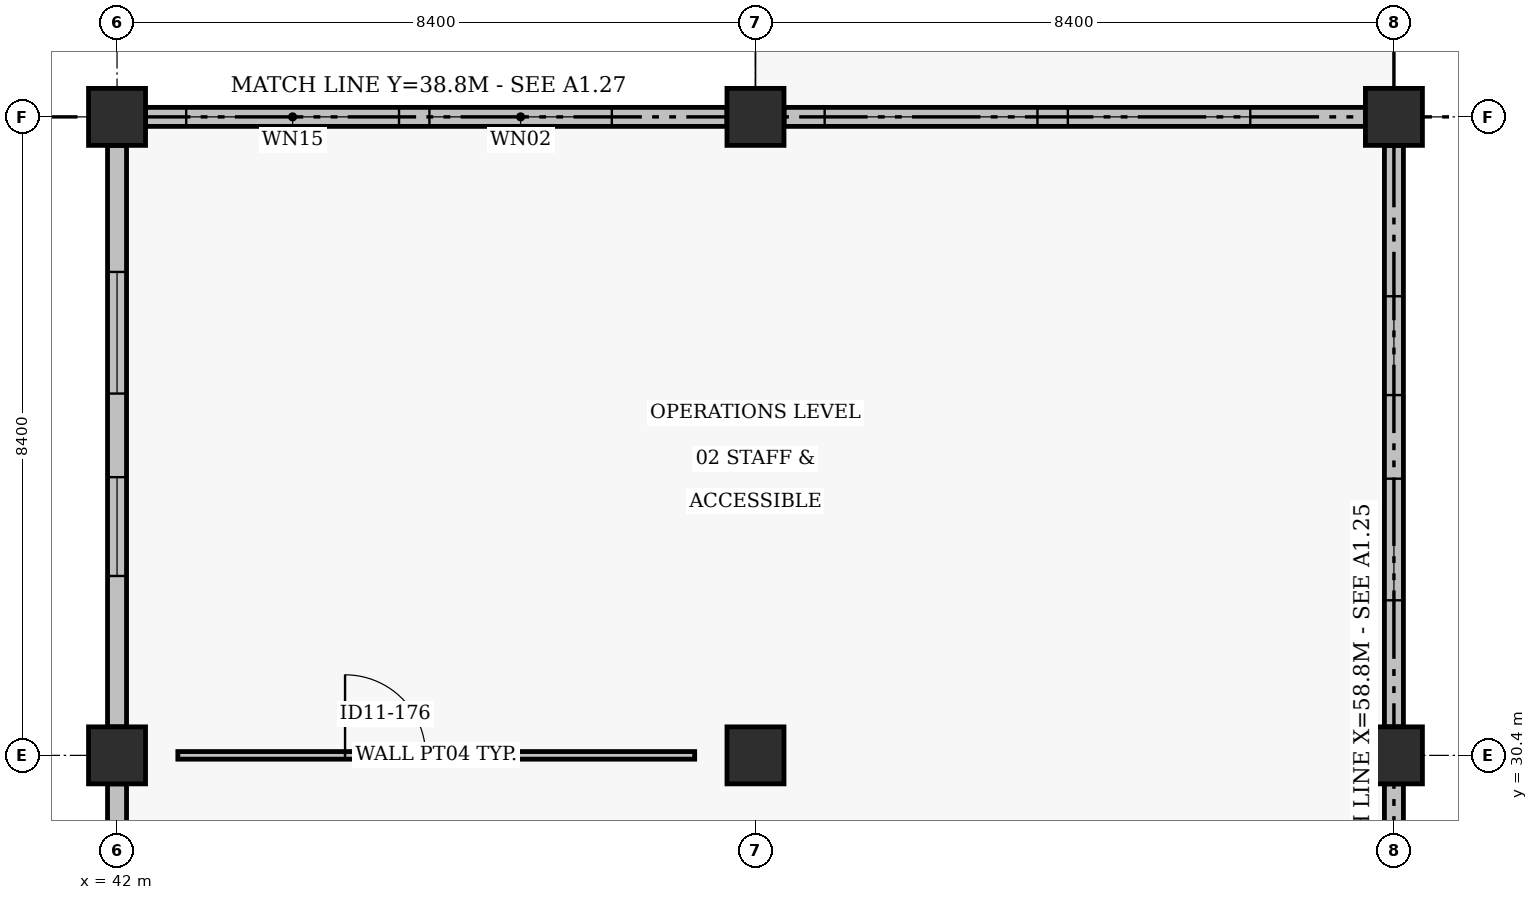
"""IFC4 building model, lengths in metres.
Left out: names, types, materials, properties, quantities, classifications, styles, units other than length and angle.
Written with IfcOpenShell. Run it as: python <this file> out.ifc"""

import sys

from ifc_helpers import new_model, si_unit, direction, frame, frame_2d, origin, origin_2d, place, context, subcontext, project, spatial, rectangle, extrude, element, fill, save


model = new_model("IFC4")
c1 = context("Model", 3, precision=1e-05, world=origin(), true_north=direction((0.0, 1.0)))
c2 = subcontext(c1, "Body", "Model", "MODEL_VIEW")
j1 = project(units=[si_unit("LENGTHUNIT", "METRE"), si_unit("PLANEANGLEUNIT", "RADIAN")], contexts=[c1])
p1 = place(None, origin())
s1 = spatial("IfcSite", under=j1, at=p1, CompositionType="ELEMENT")
p2 = place(p1, origin())
s2 = spatial("IfcBuilding", under=s1, at=p2, CompositionType="ELEMENT")
p3 = place(p2, frame((0.0, 0.0, 9.6)))
s3 = spatial("IfcBuildingStorey", under=s2, at=p3, CompositionType="ELEMENT", Elevation=9.6)
for number, where, z_axis, x_axis in (
    (1, (42.0, 30.4, 0.0), (0.0, 0.0, 1.0), (1.0, 0.0, 0.0)),
    (2, (42.0, 38.8, 0.0), (0.0, 0.0, 1.0), (1.0, 0.0, 0.0)),
    (3, (50.4, 30.4, 0.0), (0.0, 0.0, 1.0), (1.0, 0.0, 0.0)),
    (4, (50.4, 38.8, 0.0), (0.0, 0.0, 1.0), (1.0, 0.0, 0.0)),
    (5, (58.8, 30.4, 0.0), (0.0, 0.0, 1.0), (1.0, 0.0, 0.0)),
    (6, (58.8, 38.8, 0.0), (0.0, 0.0, 1.0), (1.0, 0.0, 0.0)),
):
    element("IfcColumn", number, at=place(p3, frame(where, z_axis=z_axis, x_axis=x_axis)), inside=s3, PredefinedType="COLUMN", context=c2, shape_type="SweptSolid", body=[
        extrude(rectangle(XDim=0.75, YDim=0.75, at=origin_2d()), origin(), (0.0, 0.0, 1.0), 3.52),
    ])
p4 = place(p3, frame((42.0, 30.025, 0.0), z_axis=(0.0, 0.0, 1.0), x_axis=(0.0, -1.0, 0.0)))
e7 = element("IfcWall", 7, at=p4, inside=s3, PredefinedType="SOLIDWALL", context=c2, shape_type="SweptSolid", body=[
    extrude(rectangle(XDim=7.65, YDim=0.25, at=frame_2d((3.825, 0.0))), origin(), (0.0, 0.0, 1.0), 2.805),
])
p5 = place(p4, frame((1.665, 0.0, 0.95)))
e8 = element("IfcOpeningElement", 8, at=p5, cuts=e7, PredefinedType="OPENING", context=c2, shape_type="SweptSolid", body=[
    extrude(rectangle(XDim=1.6, YDim=1.35, at=frame_2d((0.8, 0.675))), frame((0.0, 0.135, 0.0), z_axis=(0.0, -1.0, 0.0), x_axis=(1.0, 0.0, 0.0)), (0.0, 0.0, 1.0), 0.27),
])
p6 = place(p4, frame((4.365, 0.0, 0.95)))
e9 = element("IfcOpeningElement", 9, at=p6, cuts=e7, PredefinedType="OPENING", context=c2, shape_type="SweptSolid", body=[
    extrude(rectangle(XDim=1.3, YDim=1.35, at=frame_2d((0.65, 0.675))), frame((0.0, 0.135, 0.0), z_axis=(0.0, -1.0, 0.0), x_axis=(1.0, 0.0, 0.0)), (0.0, 0.0, 1.0), 0.27),
])
p7 = place(p3, frame((58.8, 22.375, 0.0), z_axis=(0.0, 0.0, 1.0), x_axis=(0.0, 1.0, 0.0)))
e10 = element("IfcWall", 10, at=p7, inside=s3, PredefinedType="SOLIDWALL", context=c2, shape_type="SweptSolid", body=[
    extrude(rectangle(XDim=7.65, YDim=0.25, at=frame_2d((3.825, 0.0))), origin(), (0.0, 0.0, 1.0), 2.805),
])
p8 = place(p7, frame((1.665, 0.0, 0.95)))
e11 = element("IfcOpeningElement", 11, at=p8, cuts=e10, PredefinedType="OPENING", context=c2, shape_type="SweptSolid", body=[
    extrude(rectangle(XDim=1.6, YDim=1.35, at=frame_2d((0.8, 0.675))), frame((0.0, 0.135, 0.0), z_axis=(0.0, -1.0, 0.0), x_axis=(1.0, 0.0, 0.0)), (0.0, 0.0, 1.0), 0.27),
])
p9 = place(p7, frame((4.365, 0.0, 0.95)))
e12 = element("IfcOpeningElement", 12, at=p9, cuts=e10, PredefinedType="OPENING", context=c2, shape_type="SweptSolid", body=[
    extrude(rectangle(XDim=1.3, YDim=1.35, at=frame_2d((0.65, 0.675))), frame((0.0, 0.135, 0.0), z_axis=(0.0, -1.0, 0.0), x_axis=(1.0, 0.0, 0.0)), (0.0, 0.0, 1.0), 0.27),
])
p10 = place(p3, frame((42.0, 38.425, 0.0), z_axis=(0.0, 0.0, 1.0), x_axis=(0.0, -1.0, 0.0)))
e13 = element("IfcWall", 13, at=p10, inside=s3, PredefinedType="SOLIDWALL", context=c2, shape_type="SweptSolid", body=[
    extrude(rectangle(XDim=7.65, YDim=0.25, at=frame_2d((3.825, 0.0))), origin(), (0.0, 0.0, 1.0), 2.805),
])
p11 = place(p10, frame((1.665, 0.0, 0.95)))
e14 = element("IfcOpeningElement", 14, at=p11, cuts=e13, PredefinedType="OPENING", context=c2, shape_type="SweptSolid", body=[
    extrude(rectangle(XDim=1.6, YDim=1.35, at=frame_2d((0.8, 0.675))), frame((0.0, 0.135, 0.0), z_axis=(0.0, -1.0, 0.0), x_axis=(1.0, 0.0, 0.0)), (0.0, 0.0, 1.0), 0.27),
])
p12 = place(p10, frame((4.365, 0.0, 0.95)))
e15 = element("IfcOpeningElement", 15, at=p12, cuts=e13, PredefinedType="OPENING", context=c2, shape_type="SweptSolid", body=[
    extrude(rectangle(XDim=1.3, YDim=1.35, at=frame_2d((0.65, 0.675))), frame((0.0, 0.135, 0.0), z_axis=(0.0, -1.0, 0.0), x_axis=(1.0, 0.0, 0.0)), (0.0, 0.0, 1.0), 0.27),
])
p13 = place(p3, frame((58.8, 30.775, 0.0), z_axis=(0.0, 0.0, 1.0), x_axis=(0.0, 1.0, 0.0)))
e16 = element("IfcWall", 16, at=p13, inside=s3, PredefinedType="SOLIDWALL", context=c2, shape_type="SweptSolid", body=[
    extrude(rectangle(XDim=7.65, YDim=0.25, at=frame_2d((3.825, 0.0))), origin(), (0.0, 0.0, 1.0), 2.805),
])
p14 = place(p13, frame((1.665, 0.0, 0.95)))
e17 = element("IfcOpeningElement", 17, at=p14, cuts=e16, PredefinedType="OPENING", context=c2, shape_type="SweptSolid", body=[
    extrude(rectangle(XDim=1.6, YDim=1.35, at=frame_2d((0.8, 0.675))), frame((0.0, 0.135, 0.0), z_axis=(0.0, -1.0, 0.0), x_axis=(1.0, 0.0, 0.0)), (0.0, 0.0, 1.0), 0.27),
])
p15 = place(p13, frame((4.365, 0.0, 0.95)))
e18 = element("IfcOpeningElement", 18, at=p15, cuts=e16, PredefinedType="OPENING", context=c2, shape_type="SweptSolid", body=[
    extrude(rectangle(XDim=1.3, YDim=1.35, at=frame_2d((0.65, 0.675))), frame((0.0, 0.135, 0.0), z_axis=(0.0, -1.0, 0.0), x_axis=(1.0, 0.0, 0.0)), (0.0, 0.0, 1.0), 0.27),
])
p16 = place(p3, frame((50.025, 38.8, 0.0), z_axis=(0.0, 0.0, 1.0), x_axis=(-1.0, 0.0, 0.0)))
e19 = element("IfcWall", 19, at=p16, inside=s3, PredefinedType="SOLIDWALL", context=c2, shape_type="SweptSolid", body=[
    extrude(rectangle(XDim=7.65, YDim=0.25, at=frame_2d((3.825, 0.0))), origin(), (0.0, 0.0, 1.0), 2.805),
])
p17 = place(p16, frame((1.515, 0.0, 0.95)))
e20 = element("IfcOpeningElement", 20, at=p17, cuts=e19, PredefinedType="OPENING", context=c2, shape_type="SweptSolid", body=[
    extrude(rectangle(XDim=2.4, YDim=1.5, at=frame_2d((1.2, 0.75))), frame((0.0, 0.135, 0.0), z_axis=(0.0, -1.0, 0.0), x_axis=(1.0, 0.0, 0.0)), (0.0, 0.0, 1.0), 0.27),
])
p18 = place(p16, frame((4.315, 0.0, 1.35)))
e21 = element("IfcOpeningElement", 21, at=p18, cuts=e19, PredefinedType="OPENING", context=c2, shape_type="SweptSolid", body=[
    extrude(rectangle(XDim=2.8, YDim=1.05, at=frame_2d((1.4, 0.525))), frame((0.0, 0.135, 0.0), z_axis=(0.0, -1.0, 0.0), x_axis=(1.0, 0.0, 0.0)), (0.0, 0.0, 1.0), 0.27),
])
p19 = place(p3, frame((58.425, 38.8, 0.0), z_axis=(0.0, 0.0, 1.0), x_axis=(-1.0, 0.0, 0.0)))
e22 = element("IfcWall", 22, at=p19, inside=s3, PredefinedType="SOLIDWALL", context=c2, shape_type="SweptSolid", body=[
    extrude(rectangle(XDim=7.65, YDim=0.25, at=frame_2d((3.825, 0.0))), origin(), (0.0, 0.0, 1.0), 2.805),
])
p20 = place(p19, frame((1.515, 0.0, 0.95)))
e23 = element("IfcOpeningElement", 23, at=p20, cuts=e22, PredefinedType="OPENING", context=c2, shape_type="SweptSolid", body=[
    extrude(rectangle(XDim=2.4, YDim=1.5, at=frame_2d((1.2, 0.75))), frame((0.0, 0.135, 0.0), z_axis=(0.0, -1.0, 0.0), x_axis=(1.0, 0.0, 0.0)), (0.0, 0.0, 1.0), 0.27),
])
p21 = place(p19, frame((4.315, 0.0, 1.35)))
e24 = element("IfcOpeningElement", 24, at=p21, cuts=e22, PredefinedType="OPENING", context=c2, shape_type="SweptSolid", body=[
    extrude(rectangle(XDim=2.8, YDim=1.05, at=frame_2d((1.4, 0.525))), frame((0.0, 0.135, 0.0), z_axis=(0.0, -1.0, 0.0), x_axis=(1.0, 0.0, 0.0)), (0.0, 0.0, 1.0), 0.27),
])
p22 = place(p3, frame((42.8, 30.4, 0.0), z_axis=(0.0, 0.0, 1.0), x_axis=(1.0, 0.0, 0.0)))
e25 = element("IfcWall", 25, at=p22, inside=s3, PredefinedType="PARTITIONING", context=c2, shape_type="SweptSolid", body=[
    extrude(rectangle(XDim=6.8, YDim=0.1, at=frame_2d((3.4, 0.0))), origin(), (0.0, 0.0, 1.0), 2.5),
])
p23 = place(p22, frame((2.2, 0.0, 0.0)))
e26 = element("IfcOpeningElement", 26, at=p23, cuts=e25, PredefinedType="OPENING", context=c2, shape_type="SweptSolid", body=[
    extrude(rectangle(XDim=1.06, YDim=2.1, at=frame_2d((0.53, 1.05))), frame((0.0, 0.06, 0.0), z_axis=(0.0, -1.0, 0.0), x_axis=(1.0, 0.0, 0.0)), (0.0, 0.0, 1.0), 0.12),
])
p24 = place(p11, origin())
e27 = element("IfcWindow", 27, at=p24, inside=s3, PartitioningType="DOUBLE_PANEL_VERTICAL", PredefinedType="WINDOW", context=c2, shape_type="SweptSolid", body=[
    extrude(rectangle(XDim=1.6, YDim=1.35, at=frame_2d((0.8, 0.675))), frame((0.0, 0.03, 0.0), z_axis=(0.0, -1.0, 0.0), x_axis=(1.0, 0.0, 0.0)), (0.0, 0.0, 1.0), 0.06),
])
fill(e14, e27)
p25 = place(p12, origin())
e28 = element("IfcWindow", 28, at=p25, inside=s3, PartitioningType="SINGLE_PANEL", PredefinedType="WINDOW", context=c2, shape_type="SweptSolid", body=[
    extrude(rectangle(XDim=1.3, YDim=1.35, at=frame_2d((0.65, 0.675))), frame((0.0, 0.03, 0.0), z_axis=(0.0, -1.0, 0.0), x_axis=(1.0, 0.0, 0.0)), (0.0, 0.0, 1.0), 0.06),
])
fill(e15, e28)
p26 = place(p14, origin())
e29 = element("IfcWindow", 29, at=p26, inside=s3, PartitioningType="DOUBLE_PANEL_VERTICAL", PredefinedType="WINDOW", context=c2, shape_type="SweptSolid", body=[
    extrude(rectangle(XDim=1.6, YDim=1.35, at=frame_2d((0.8, 0.675))), frame((0.0, 0.03, 0.0), z_axis=(0.0, -1.0, 0.0), x_axis=(1.0, 0.0, 0.0)), (0.0, 0.0, 1.0), 0.06),
])
fill(e17, e29)
p27 = place(p15, origin())
e30 = element("IfcWindow", 30, at=p27, inside=s3, PartitioningType="SINGLE_PANEL", PredefinedType="WINDOW", context=c2, shape_type="SweptSolid", body=[
    extrude(rectangle(XDim=1.3, YDim=1.35, at=frame_2d((0.65, 0.675))), frame((0.0, 0.03, 0.0), z_axis=(0.0, -1.0, 0.0), x_axis=(1.0, 0.0, 0.0)), (0.0, 0.0, 1.0), 0.06),
])
fill(e18, e30)
p28 = place(p17, origin())
e31 = element("IfcWindow", 31, at=p28, inside=s3, PartitioningType="TRIPLE_PANEL_VERTICAL", PredefinedType="WINDOW", context=c2, shape_type="SweptSolid", body=[
    extrude(rectangle(XDim=2.4, YDim=1.5, at=frame_2d((1.2, 0.75))), frame((0.0, 0.03, 0.0), z_axis=(0.0, -1.0, 0.0), x_axis=(1.0, 0.0, 0.0)), (0.0, 0.0, 1.0), 0.06),
])
fill(e20, e31)
p29 = place(p18, origin())
e32 = element("IfcWindow", 32, at=p29, inside=s3, PartitioningType="TRIPLE_PANEL_VERTICAL", PredefinedType="WINDOW", context=c2, shape_type="SweptSolid", body=[
    extrude(rectangle(XDim=2.8, YDim=1.05, at=frame_2d((1.4, 0.525))), frame((0.0, 0.03, 0.0), z_axis=(0.0, -1.0, 0.0), x_axis=(1.0, 0.0, 0.0)), (0.0, 0.0, 1.0), 0.06),
])
fill(e21, e32)
p30 = place(p20, origin())
e33 = element("IfcWindow", 33, at=p30, inside=s3, PartitioningType="TRIPLE_PANEL_VERTICAL", PredefinedType="WINDOW", context=c2, shape_type="SweptSolid", body=[
    extrude(rectangle(XDim=2.4, YDim=1.5, at=frame_2d((1.2, 0.75))), frame((0.0, 0.03, 0.0), z_axis=(0.0, -1.0, 0.0), x_axis=(1.0, 0.0, 0.0)), (0.0, 0.0, 1.0), 0.06),
])
fill(e23, e33)
p31 = place(p21, origin())
e34 = element("IfcWindow", 34, at=p31, inside=s3, PartitioningType="TRIPLE_PANEL_VERTICAL", PredefinedType="WINDOW", context=c2, shape_type="SweptSolid", body=[
    extrude(rectangle(XDim=2.8, YDim=1.05, at=frame_2d((1.4, 0.525))), frame((0.0, 0.03, 0.0), z_axis=(0.0, -1.0, 0.0), x_axis=(1.0, 0.0, 0.0)), (0.0, 0.0, 1.0), 0.06),
])
fill(e24, e34)
p32 = place(p23, origin())
e35 = element("IfcDoor", 35, at=p32, inside=s3, OperationType="SINGLE_SWING_LEFT", PredefinedType="DOOR", context=c2, shape_type="SweptSolid", body=[
    extrude(rectangle(XDim=1.06, YDim=2.1, at=frame_2d((0.53, 1.05))), frame((0.0, 0.025, 0.0), z_axis=(0.0, -1.0, 0.0), x_axis=(1.0, 0.0, 0.0)), (0.0, 0.0, 1.0), 0.05),
])
fill(e26, e35)
save(model, sys.argv[1])
